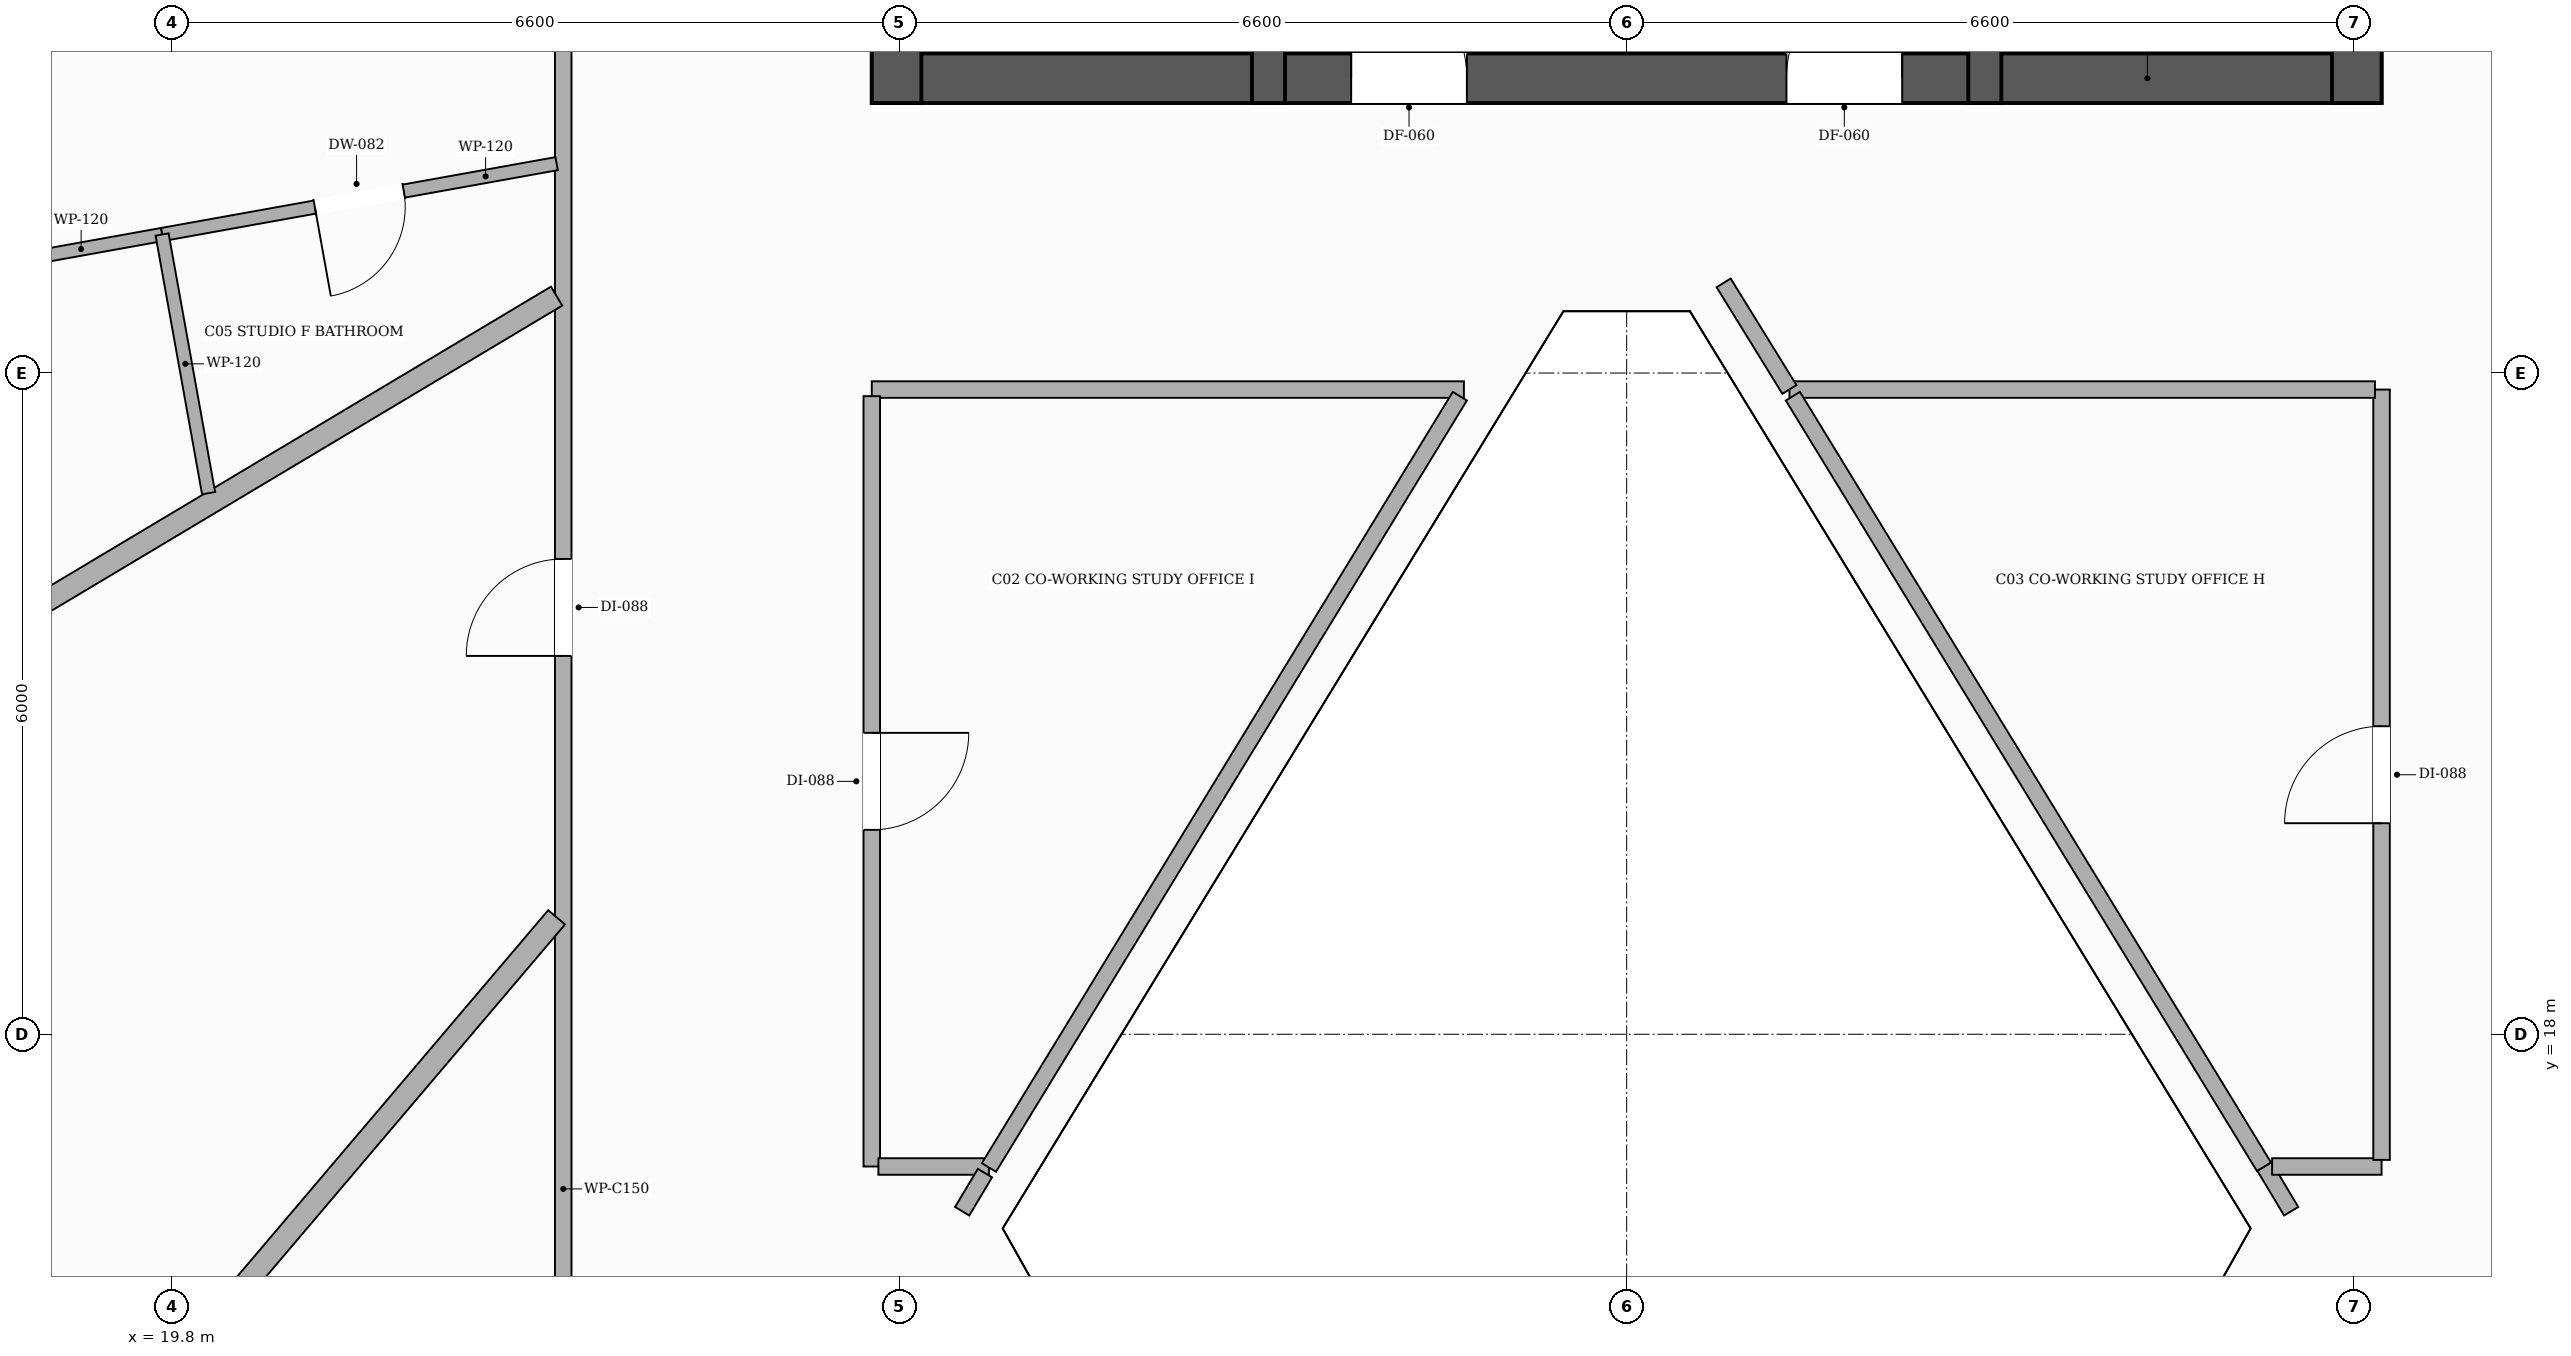
"""IFC4 building model, lengths in metres.
Left out: names, types, materials, properties, quantities, classifications, styles, units other than length and angle.
Written with IfcOpenShell. Run it as: python <this file> out.ifc"""

import sys

from ifc_helpers import new_model, si_unit, direction, frame, frame_2d, origin, place, context, subcontext, project, spatial, rectangle, extrude, element, fill, save


model = new_model("IFC4")
c1 = context("Model", 3, precision=1e-05, world=origin(), true_north=direction((0.0, 1.0)))
c2 = subcontext(c1, "Body", "Model", "MODEL_VIEW")
j1 = project(units=[si_unit("LENGTHUNIT", "METRE"), si_unit("PLANEANGLEUNIT", "RADIAN")], contexts=[c1])
p1 = place(None, origin())
s1 = spatial("IfcSite", under=j1, at=p1, CompositionType="ELEMENT")
p2 = place(p1, origin())
s2 = spatial("IfcBuilding", under=s1, at=p2, CompositionType="ELEMENT")
p3 = place(p2, frame((0.0, 0.0, 23.6)))
s3 = spatial("IfcBuildingStorey", under=s2, at=p3, CompositionType="ELEMENT", Elevation=23.6)
p4 = place(p3, frame((26.15, 26.675, 0.0), z_axis=(0.0, 0.0, 1.0), x_axis=(1.0, 0.0, 0.0)))
e1 = element("IfcWall", 1, at=p4, inside=s3, PredefinedType="SHEAR", context=c2, shape_type="SweptSolid", body=[
    extrude(rectangle(XDim=13.7, YDim=0.45, at=frame_2d((6.85, 0.0))), origin(), (0.0, 0.0, 1.0), 3.3),
])
p5 = place(p4, frame((4.35, 0.0, 0.0)))
e2 = element("IfcOpeningElement", 2, at=p5, cuts=e1, PredefinedType="OPENING", context=c2, shape_type="SweptSolid", body=[
    extrude(rectangle(XDim=1.05, YDim=2.15, at=frame_2d((0.525, 1.075))), frame((0.0, 0.235, 0.0), z_axis=(0.0, -1.0, 0.0), x_axis=(1.0, 0.0, 0.0)), (0.0, 0.0, 1.0), 0.47),
])
p6 = place(p4, frame((8.3, 0.0, 0.0)))
e3 = element("IfcOpeningElement", 3, at=p6, cuts=e1, PredefinedType="OPENING", context=c2, shape_type="SweptSolid", body=[
    extrude(rectangle(XDim=1.05, YDim=2.15, at=frame_2d((0.525, 1.075))), frame((0.0, 0.235, 0.0), z_axis=(0.0, -1.0, 0.0), x_axis=(1.0, 0.0, 0.0)), (0.0, 0.0, 1.0), 0.47),
])
for number, where, z_axis, x_axis in (
    (4, (26.375, 26.45, 0.0), (0.0, 0.0, 1.0), (0.0, 1.0, 0.0)),
    (5, (39.625, 26.45, 0.0), (0.0, 0.0, 1.0), (0.0, 1.0, 0.0)),
):
    element("IfcWall", number, at=place(p3, frame(where, z_axis=z_axis, x_axis=x_axis)), inside=s3, PredefinedType="SHEAR", context=c2, shape_type="SweptSolid", body=[
        extrude(rectangle(XDim=7.7, YDim=0.45, at=frame_2d((3.85, 0.0))), origin(), (0.0, 0.0, 1.0), 3.3),
    ])
p7 = place(p3, frame((29.75, 26.45, 0.0), z_axis=(0.0, 0.0, 1.0), x_axis=(0.0, 1.0, 0.0)))
e6 = element("IfcWall", 6, at=p7, inside=s3, PredefinedType="SHEAR", context=c2, shape_type="SweptSolid", body=[
    extrude(rectangle(XDim=8.2, YDim=0.3, at=frame_2d((4.1, 0.0))), origin(), (0.0, 0.0, 1.0), 3.3),
])
p8 = place(p7, frame((0.6, 0.0, 0.0)))
e7 = element("IfcOpeningElement", 7, at=p8, cuts=e6, PredefinedType="OPENING", context=c2, shape_type="SweptSolid", body=[
    extrude(rectangle(XDim=1.05, YDim=2.15, at=frame_2d((0.525, 1.075))), frame((0.0, 0.16, 0.0), z_axis=(0.0, -1.0, 0.0), x_axis=(1.0, 0.0, 0.0)), (0.0, 0.0, 1.0), 0.32),
])
p9 = place(p3, frame((36.25, 26.45, 0.0), z_axis=(0.0, 0.0, 1.0), x_axis=(0.0, 1.0, 0.0)))
e8 = element("IfcWall", 8, at=p9, inside=s3, PredefinedType="SHEAR", context=c2, shape_type="SweptSolid", body=[
    extrude(rectangle(XDim=8.2, YDim=0.3, at=frame_2d((4.1, 0.0))), origin(), (0.0, 0.0, 1.0), 3.3),
])
p10 = place(p9, frame((0.6, 0.0, 0.0)))
e9 = element("IfcOpeningElement", 9, at=p10, cuts=e8, PredefinedType="OPENING", context=c2, shape_type="SweptSolid", body=[
    extrude(rectangle(XDim=1.05, YDim=2.15, at=frame_2d((0.525, 1.075))), frame((0.0, 0.16, 0.0), z_axis=(0.0, -1.0, 0.0), x_axis=(1.0, 0.0, 0.0)), (0.0, 0.0, 1.0), 0.32),
])
p11 = place(p3, frame((18.957, 36.16, 0.0), z_axis=(0.0, 0.0, 1.0), x_axis=(-0.514409031138, -0.857544954323, 0.0)))
e10 = element("IfcWall", 10, at=p11, inside=s3, PredefinedType="SOLIDWALL", context=c2, shape_type="SweptSolid", body=[
    extrude(rectangle(XDim=13.248, YDim=0.24, at=frame_2d((6.624, 0.0))), origin(), (0.0, 0.0, 1.0), 2.624),
])
p12 = place(p11, frame((5.724, 0.0, 0.0)))
e11 = element("IfcOpeningElement", 11, at=p12, cuts=e10, PredefinedType="OPENING", context=c2, shape_type="SweptSolid", body=[
    extrude(rectangle(XDim=1.8, YDim=2.2, at=frame_2d((0.9, 1.1))), frame((0.0, 0.13, 0.0), z_axis=(0.0, -1.0, 0.0), x_axis=(1.0, 0.0, 0.0)), (0.0, 0.0, 1.0), 0.26),
])
p13 = place(p3, frame((23.35, 11.86, 0.0), z_axis=(0.0, 0.0, 1.0), x_axis=(0.0, 1.0, 0.0)))
e12 = element("IfcWall", 12, at=p13, inside=s3, PredefinedType="PARTITIONING", context=c2, shape_type="SweptSolid", body=[
    extrude(rectangle(XDim=25.04, YDim=0.15, at=frame_2d((12.52, 0.0))), origin(), (0.0, 0.0, 1.0), 2.413),
])
p14 = place(p13, frame((9.573, 0.0, 0.0)))
e13 = element("IfcOpeningElement", 13, at=p14, cuts=e12, PredefinedType="OPENING", context=c2, shape_type="SweptSolid", body=[
    extrude(rectangle(XDim=0.88, YDim=2.1, at=frame_2d((0.44, 1.05))), frame((0.0, 0.085, 0.0), z_axis=(0.0, -1.0, 0.0), x_axis=(1.0, 0.0, 0.0)), (0.0, 0.0, 1.0), 0.17),
])
p15 = place(p13, frame((18.329, 0.0, 0.0)))
e14 = element("IfcOpeningElement", 14, at=p15, cuts=e12, PredefinedType="OPENING", context=c2, shape_type="SweptSolid", body=[
    extrude(rectangle(XDim=0.92, YDim=2.15, at=frame_2d((0.46, 1.075))), frame((0.0, 0.085, 0.0), z_axis=(0.0, -1.0, 0.0), x_axis=(1.0, 0.0, 0.0)), (0.0, 0.0, 1.0), 0.17),
])
p16 = place(p3, frame((31.523, 23.85, 0.0), z_axis=(0.0, 0.0, 1.0), x_axis=(-1.0, 0.0, 0.0)))
e15 = element("IfcWall", 15, at=p16, inside=s3, PredefinedType="PARTITIONING", context=c2, shape_type="SweptSolid", body=[
    extrude(rectangle(XDim=5.373, YDim=0.15, at=frame_2d((2.687, 0.0))), origin(), (0.0, 0.0, 1.0), 2.669),
])
p17 = place(p3, frame((26.15, 23.79, 0.0), z_axis=(0.0, 0.0, 1.0), x_axis=(0.0, -1.0, 0.0)))
e16 = element("IfcWall", 16, at=p17, inside=s3, PredefinedType="PARTITIONING", context=c2, shape_type="SweptSolid", body=[
    extrude(rectangle(XDim=6.99, YDim=0.15, at=frame_2d((3.495, 0.0))), origin(), (0.0, 0.0, 1.0), 2.669),
])
p18 = place(p17, frame((3.055, 0.0, 0.0)))
e17 = element("IfcOpeningElement", 17, at=p18, cuts=e16, PredefinedType="OPENING", context=c2, shape_type="SweptSolid", body=[
    extrude(rectangle(XDim=0.88, YDim=2.1, at=frame_2d((0.44, 1.05))), frame((0.0, 0.085, 0.0), z_axis=(0.0, -1.0, 0.0), x_axis=(1.0, 0.0, 0.0)), (0.0, 0.0, 1.0), 0.17),
])
p19 = place(p3, frame((26.21, 16.8, 0.0), z_axis=(0.0, 0.0, 1.0), x_axis=(1.0, 0.0, 0.0)))
e18 = element("IfcWall", 18, at=p19, inside=s3, PredefinedType="PARTITIONING", context=c2, shape_type="SweptSolid", body=[
    extrude(rectangle(XDim=1.003, YDim=0.15, at=frame_2d((0.501, 0.0))), origin(), (0.0, 0.0, 1.0), 3.06),
])
p20 = place(p3, frame((27.177, 16.74, 0.0), z_axis=(0.0, 0.0, 1.0), x_axis=(-0.513515835534, -0.858080116688, 0.0)))
e19 = element("IfcWall", 19, at=p20, inside=s3, PredefinedType="PARTITIONING", context=c2, shape_type="SweptSolid", body=[
    extrude(rectangle(XDim=0.403, YDim=0.15, at=frame_2d((0.202, 0.0))), origin(), (0.0, 0.0, 1.0), 3.06),
])
p21 = place(p3, frame((39.03, 16.394, 0.0), z_axis=(0.0, 0.0, 1.0), x_axis=(-0.51343298076, 0.858129695482, 0.0)))
e20 = element("IfcWall", 20, at=p21, inside=s3, PredefinedType="PARTITIONING", context=c2, shape_type="SweptSolid", body=[
    extrude(rectangle(XDim=0.473, YDim=0.15, at=frame_2d((0.237, 0.0))), origin(), (0.0, 0.0, 1.0), 3.06),
])
p22 = place(p3, frame((38.857, 16.8, 0.0), z_axis=(0.0, 0.0, 1.0), x_axis=(1.0, 0.0, 0.0)))
e21 = element("IfcWall", 21, at=p22, inside=s3, PredefinedType="PARTITIONING", context=c2, shape_type="SweptSolid", body=[
    extrude(rectangle(XDim=0.993, YDim=0.15, at=frame_2d((0.497, 0.0))), origin(), (0.0, 0.0, 1.0), 3.06),
])
p23 = place(p3, frame((39.85, 16.86, 0.0), z_axis=(0.0, 0.0, 1.0), x_axis=(0.0, 1.0, 0.0)))
e22 = element("IfcWall", 22, at=p23, inside=s3, PredefinedType="PARTITIONING", context=c2, shape_type="SweptSolid", body=[
    extrude(rectangle(XDim=6.99, YDim=0.15, at=frame_2d((3.495, 0.0))), origin(), (0.0, 0.0, 1.0), 2.669),
])
p24 = place(p23, frame((3.055, 0.0, 0.0)))
e23 = element("IfcOpeningElement", 23, at=p24, cuts=e22, PredefinedType="OPENING", context=c2, shape_type="SweptSolid", body=[
    extrude(rectangle(XDim=0.88, YDim=2.1, at=frame_2d((0.44, 1.05))), frame((0.0, 0.085, 0.0), z_axis=(0.0, -1.0, 0.0), x_axis=(1.0, 0.0, 0.0)), (0.0, 0.0, 1.0), 0.17),
])
p25 = place(p3, frame((39.79, 23.85, 0.0), z_axis=(0.0, 0.0, 1.0), x_axis=(-1.0, 0.0, 0.0)))
e24 = element("IfcWall", 24, at=p25, inside=s3, PredefinedType="PARTITIONING", context=c2, shape_type="SweptSolid", body=[
    extrude(rectangle(XDim=5.313, YDim=0.15, at=frame_2d((2.656, 0.0))), origin(), (0.0, 0.0, 1.0), 2.669),
])
p26 = place(p3, frame((34.477, 23.851, 0.0), z_axis=(0.0, 0.0, 1.0), x_axis=(-0.52541513414, 0.8508460124, 0.0)))
e25 = element("IfcWall", 25, at=p26, inside=s3, PredefinedType="PARTITIONING", context=c2, shape_type="SweptSolid", body=[
    extrude(rectangle(XDim=1.136, YDim=0.15, at=frame_2d((0.568, 0.0))), origin(), (0.0, 0.0, 1.0), 3.06),
])
p27 = place(p3, frame((27.213, 16.791, 0.0), z_axis=(0.0, 0.0, 1.0), x_axis=(0.521095914239, 0.853498124288, 0.0)))
e26 = element("IfcWall", 26, at=p27, inside=s3, PredefinedType="PARTITIONING", context=c2, shape_type="SweptSolid", body=[
    extrude(rectangle(XDim=8.2, YDim=0.15, at=frame_2d((4.1, 0.0))), origin(), (0.0, 0.0, 1.0), 2.669),
])
p28 = place(p3, frame((34.508, 23.79, 0.0), z_axis=(0.0, 0.0, 1.0), x_axis=(0.52163195406, -0.853170618636, 0.0)))
e27 = element("IfcWall", 27, at=p28, inside=s3, PredefinedType="PARTITIONING", context=c2, shape_type="SweptSolid", body=[
    extrude(rectangle(XDim=8.195, YDim=0.15, at=frame_2d((4.098, 0.0))), origin(), (0.0, 0.0, 1.0), 2.669),
])
p29 = place(p3, frame((9.583, 2.913, 0.0), z_axis=(0.0, 0.0, 1.0), x_axis=(0.647135024662, 0.76237540612, 0.0)))
e28 = element("IfcWall", 28, at=p29, inside=s3, PredefinedType="PARTITIONING", context=c2, shape_type="SweptSolid", body=[
    extrude(rectangle(XDim=21.181, YDim=0.2, at=frame_2d((10.591, 0.0))), origin(), (0.0, 0.0, 1.0), 2.413),
])
p30 = place(p3, frame((7.616, 15.333, 0.0), z_axis=(0.0, 0.0, 1.0), x_axis=(0.85844474206, 0.512906058483, 0.0)))
e29 = element("IfcWall", 29, at=p30, inside=s3, PredefinedType="PARTITIONING", context=c2, shape_type="SweptSolid", body=[
    extrude(rectangle(XDim=18.259, YDim=0.2, at=frame_2d((9.129, 0.0))), origin(), (0.0, 0.0, 1.0), 2.413),
])
p31 = place(p3, frame((23.29, 25.9, 0.0), z_axis=(0.0, 0.0, 1.0), x_axis=(-0.984259533521, -0.176729088363, 0.0)))
e30 = element("IfcWall", 30, at=p31, inside=s3, PredefinedType="PARTITIONING", context=c2, shape_type="SweptSolid", body=[
    extrude(rectangle(XDim=3.637, YDim=0.12, at=frame_2d((1.819, 0.0))), origin(), (0.0, 0.0, 1.0), 2.669),
])
p32 = place(p31, frame((1.409, 0.0, 0.0)))
e31 = element("IfcOpeningElement", 31, at=p32, cuts=e30, PredefinedType="OPENING", context=c2, shape_type="SweptSolid", body=[
    extrude(rectangle(XDim=0.82, YDim=2.1, at=frame_2d((0.41, 1.05))), frame((0.0, 0.07, 0.0), z_axis=(0.0, -1.0, 0.0), x_axis=(1.0, 0.0, 0.0)), (0.0, 0.0, 1.0), 0.14),
])
p33 = place(p3, frame((19.71, 25.257, 0.0), z_axis=(0.0, 0.0, 1.0), x_axis=(-0.984233964359, -0.176871431843, 0.0)))
e32 = element("IfcWall", 32, at=p33, inside=s3, PredefinedType="PARTITIONING", context=c2, shape_type="SweptSolid", body=[
    extrude(rectangle(XDim=4.065, YDim=0.12, at=frame_2d((2.033, 0.0))), origin(), (0.0, 0.0, 1.0), 2.413),
])
p34 = place(p33, frame((1.593, 0.0, 0.0)))
e33 = element("IfcOpeningElement", 33, at=p34, cuts=e32, PredefinedType="OPENING", context=c2, shape_type="SweptSolid", body=[
    extrude(rectangle(XDim=0.88, YDim=2.1, at=frame_2d((0.44, 1.05))), frame((0.0, 0.07, 0.0), z_axis=(0.0, -1.0, 0.0), x_axis=(1.0, 0.0, 0.0)), (0.0, 0.0, 1.0), 0.14),
])
p35 = place(p3, frame((20.132, 22.91, 0.0), z_axis=(0.0, 0.0, 1.0), x_axis=(-0.177002273268, 0.984210442567, 0.0)))
e34 = element("IfcWall", 34, at=p35, inside=s3, PredefinedType="PARTITIONING", context=c2, shape_type="SweptSolid", body=[
    extrude(rectangle(XDim=2.385, YDim=0.12, at=frame_2d((1.192, 0.0))), origin(), (0.0, 0.0, 1.0), 2.669),
])
p36 = place(p5, origin())
e35 = element("IfcDoor", 35, at=p36, inside=s3, OperationType="SINGLE_SWING_LEFT", PredefinedType="DOOR", context=c2, shape_type="SweptSolid", body=[
    extrude(rectangle(XDim=1.05, YDim=2.15, at=frame_2d((0.525, 1.075))), frame((0.0, 0.025, 0.0), z_axis=(0.0, -1.0, 0.0), x_axis=(1.0, 0.0, 0.0)), (0.0, 0.0, 1.0), 0.05),
])
fill(e2, e35)
p37 = place(p6, origin())
e36 = element("IfcDoor", 36, at=p37, inside=s3, OperationType="SINGLE_SWING_RIGHT", PredefinedType="DOOR", context=c2, shape_type="SweptSolid", body=[
    extrude(rectangle(XDim=1.05, YDim=2.15, at=frame_2d((0.525, 1.075))), frame((0.0, 0.025, 0.0), z_axis=(0.0, -1.0, 0.0), x_axis=(1.0, 0.0, 0.0)), (0.0, 0.0, 1.0), 0.05),
])
fill(e3, e36)
p38 = place(p14, origin())
e37 = element("IfcDoor", 37, at=p38, inside=s3, OperationType="SINGLE_SWING_LEFT", PredefinedType="DOOR", context=c2, shape_type="SweptSolid", body=[
    extrude(rectangle(XDim=0.88, YDim=2.1, at=frame_2d((0.44, 1.05))), frame((0.0, 0.025, 0.0), z_axis=(0.0, -1.0, 0.0), x_axis=(1.0, 0.0, 0.0)), (0.0, 0.0, 1.0), 0.05),
])
fill(e13, e37)
p39 = place(p32, origin())
e38 = element("IfcDoor", 38, at=p39, inside=s3, OperationType="SINGLE_SWING_RIGHT", PredefinedType="DOOR", context=c2, shape_type="SweptSolid", body=[
    extrude(rectangle(XDim=0.82, YDim=2.1, at=frame_2d((0.41, 1.05))), frame((0.0, 0.025, 0.0), z_axis=(0.0, -1.0, 0.0), x_axis=(1.0, 0.0, 0.0)), (0.0, 0.0, 1.0), 0.05),
])
fill(e31, e38)
p40 = place(p24, origin())
e39 = element("IfcDoor", 39, at=p40, inside=s3, OperationType="SINGLE_SWING_LEFT", PredefinedType="DOOR", context=c2, shape_type="SweptSolid", body=[
    extrude(rectangle(XDim=0.88, YDim=2.1, at=frame_2d((0.44, 1.05))), frame((0.0, 0.025, 0.0), z_axis=(0.0, -1.0, 0.0), x_axis=(1.0, 0.0, 0.0)), (0.0, 0.0, 1.0), 0.05),
])
fill(e23, e39)
p41 = place(p18, origin())
e40 = element("IfcDoor", 40, at=p41, inside=s3, OperationType="SINGLE_SWING_LEFT", PredefinedType="DOOR", context=c2, shape_type="SweptSolid", body=[
    extrude(rectangle(XDim=0.88, YDim=2.1, at=frame_2d((0.44, 1.05))), frame((0.0, 0.025, 0.0), z_axis=(0.0, -1.0, 0.0), x_axis=(1.0, 0.0, 0.0)), (0.0, 0.0, 1.0), 0.05),
])
fill(e17, e40)
save(model, sys.argv[1])
